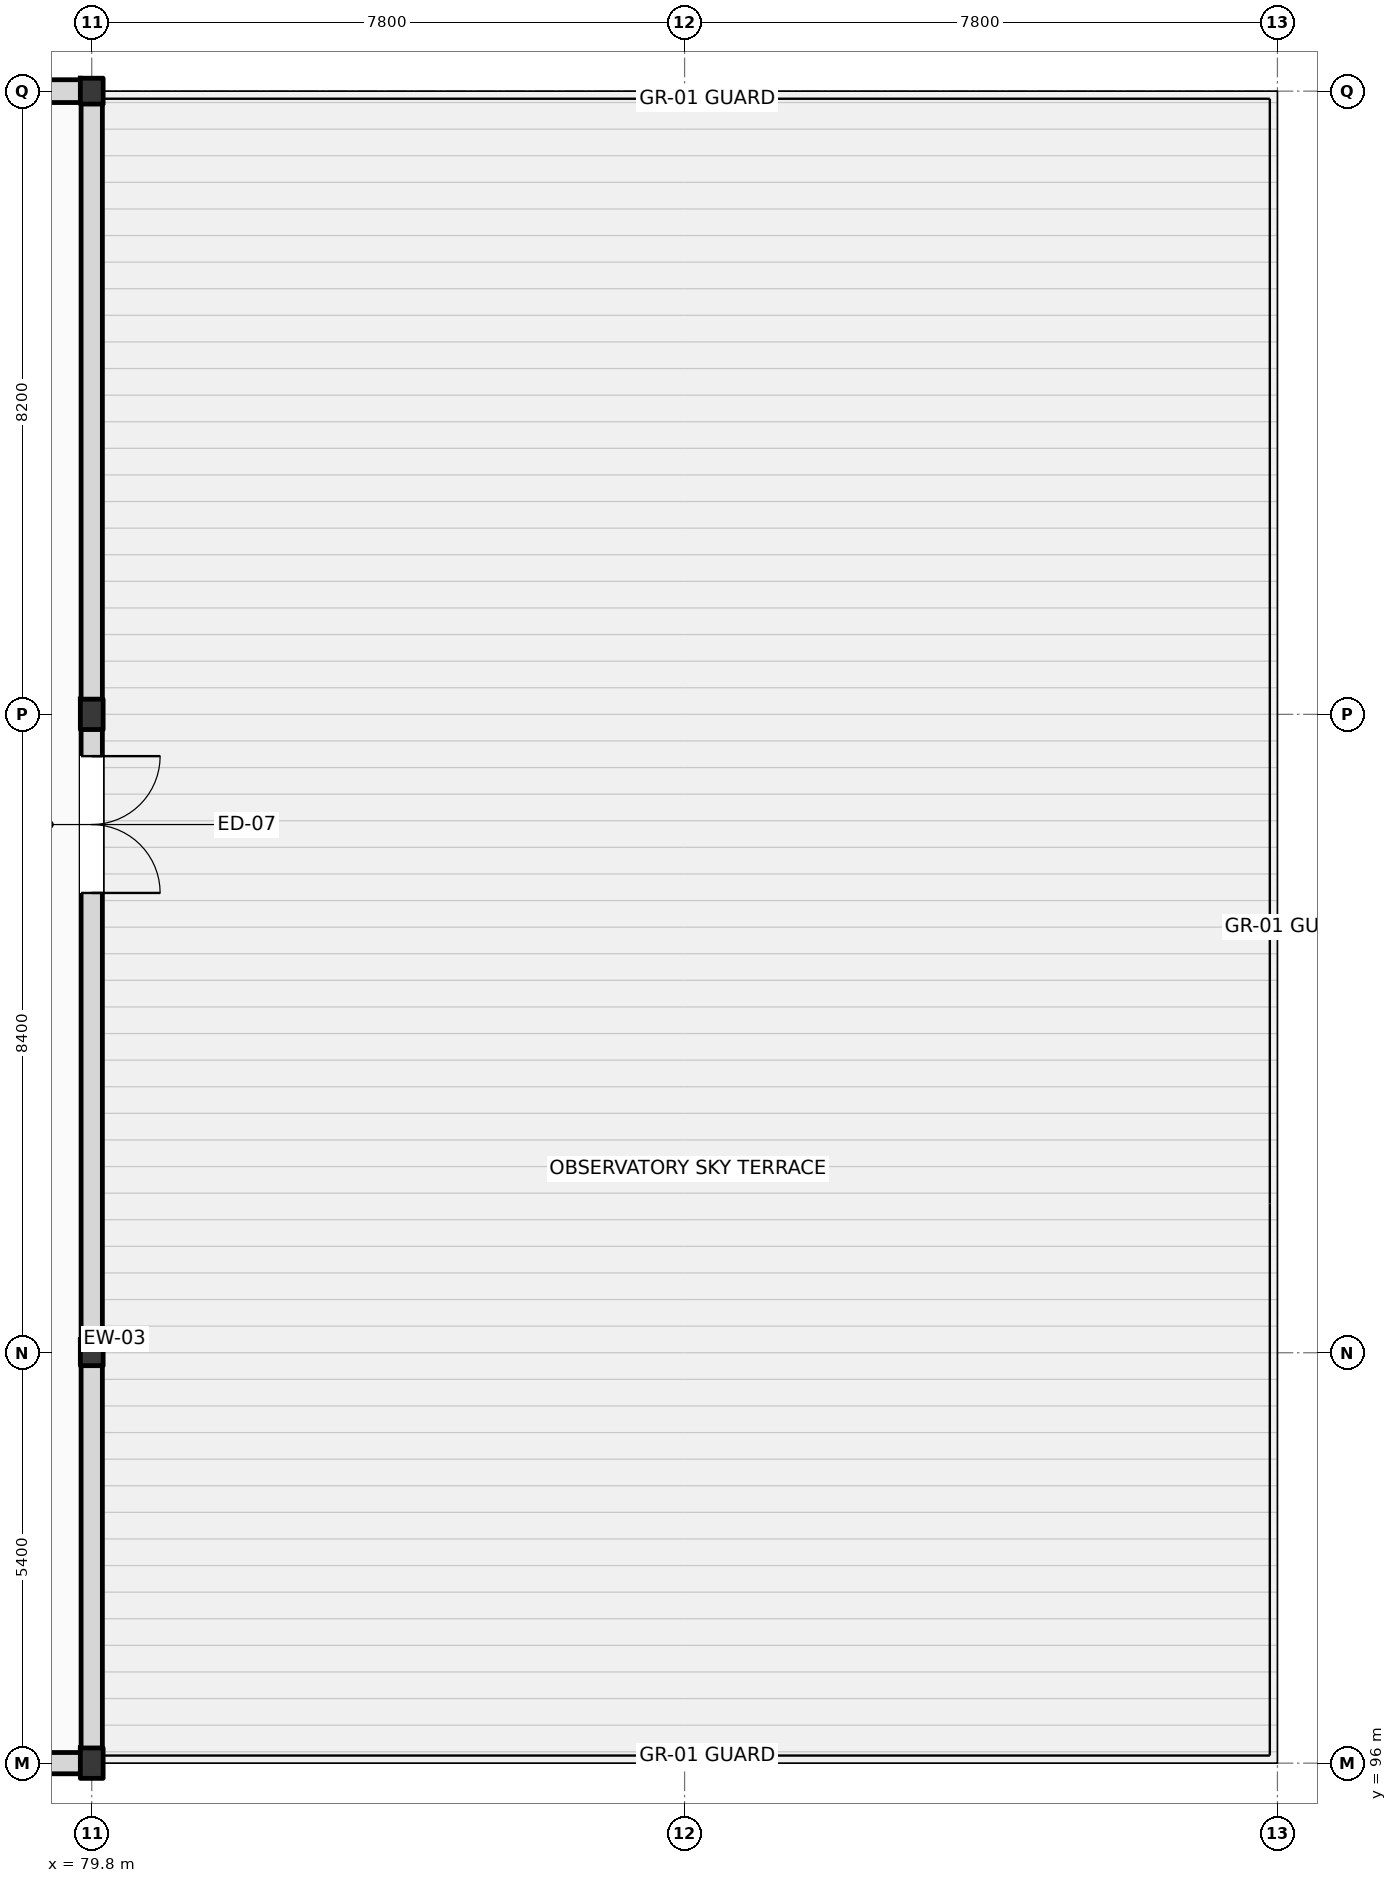
"""IFC4 building model, lengths in metres.
Left out: names, types, materials, properties, quantities, classifications, styles, units other than length and angle.
Written with IfcOpenShell. Run it as: python <this file> out.ifc"""

import sys

from ifc_helpers import new_model, si_unit, direction, frame, frame_2d, origin, origin_2d, place, context, subcontext, project, spatial, rectangle, i_section, extrude, element, fill, save


model = new_model("IFC4")
c1 = context("Model", 3, precision=1e-05, world=origin(), true_north=direction((0.0, 1.0)))
c2 = subcontext(c1, "Body", "Model", "MODEL_VIEW")
j1 = project(units=[si_unit("LENGTHUNIT", "METRE"), si_unit("PLANEANGLEUNIT", "RADIAN")], contexts=[c1])
p1 = place(None, origin())
s1 = spatial("IfcSite", under=j1, at=p1, CompositionType="ELEMENT")
p2 = place(p1, origin())
s2 = spatial("IfcBuilding", under=s1, at=p2, CompositionType="ELEMENT")
p3 = place(p2, frame((0.0, 0.0, 46.8)))
s3 = spatial("IfcBuildingStorey", under=s2, at=p3, CompositionType="ELEMENT", Elevation=46.8)
p4 = place(p3, frame((79.8, 96.0, 0.0), z_axis=(0.0, 0.0, 1.0), x_axis=(1.0, 0.0, 0.0)))
e1 = element("IfcColumn", 1, at=p4, inside=s3, PredefinedType="COLUMN", context=c2, shape_type="SweptSolid", body=[
    extrude(i_section(OverallWidth=0.3, OverallDepth=0.4, WebThickness=0.013, FlangeThickness=0.024, FilletRadius=0.027, at=origin_2d()), origin(), (0.0, 0.0, 1.0), 4.8),
])
p5 = place(p3, frame((79.8, 101.4, 0.0), z_axis=(0.0, 0.0, 1.0), x_axis=(1.0, 0.0, 0.0)))
e2 = element("IfcColumn", 2, at=p5, inside=s3, PredefinedType="COLUMN", context=c2, shape_type="SweptSolid", body=[
    extrude(i_section(OverallWidth=0.3, OverallDepth=0.34, WebThickness=0.012, FlangeThickness=0.021, FilletRadius=0.027, at=origin_2d()), origin(), (0.0, 0.0, 1.0), 4.8),
])
p6 = place(p3, frame((79.8, 109.8, 0.0), z_axis=(0.0, 0.0, 1.0), x_axis=(1.0, 0.0, 0.0)))
e3 = element("IfcColumn", 3, at=p6, inside=s3, PredefinedType="COLUMN", context=c2, shape_type="SweptSolid", body=[
    extrude(i_section(OverallWidth=0.3, OverallDepth=0.4, WebThickness=0.013, FlangeThickness=0.024, FilletRadius=0.027, at=origin_2d()), origin(), (0.0, 0.0, 1.0), 4.8),
])
p7 = place(p3, frame((79.8, 118.0, 0.0), z_axis=(0.0, 0.0, 1.0), x_axis=(1.0, 0.0, 0.0)))
e4 = element("IfcColumn", 4, at=p7, inside=s3, PredefinedType="COLUMN", context=c2, shape_type="SweptSolid", body=[
    extrude(i_section(OverallWidth=0.3, OverallDepth=0.34, WebThickness=0.012, FlangeThickness=0.021, FilletRadius=0.027, at=origin_2d()), origin(), (0.0, 0.0, 1.0), 4.8),
])
p8 = place(p3, frame((22.5, 118.0, 0.0), z_axis=(0.0, 0.0, 1.0), x_axis=(1.0, 0.0, 0.0)))
e5 = element("IfcWall", 5, at=p8, inside=s3, PredefinedType="STANDARD", context=c2, shape_type="SweptSolid", body=[
    extrude(rectangle(XDim=57.3, YDim=0.3, at=frame_2d((28.65, 0.0))), origin(), (0.0, 0.0, 1.0), 4.08),
])
p9 = place(p8, frame((3.5, 0.0, 0.85)))
e6 = element("IfcOpeningElement", 6, at=p9, cuts=e5, PredefinedType="OPENING", context=c2, shape_type="SweptSolid", body=[
    extrude(rectangle(XDim=2.7, YDim=2.4, at=frame_2d((1.35, 1.2))), frame((0.0, 0.16, 0.0), z_axis=(0.0, -1.0, 0.0), x_axis=(1.0, 0.0, 0.0)), (0.0, 0.0, 1.0), 0.32),
])
p10 = place(p8, frame((19.1, 0.0, 0.85)))
e7 = element("IfcOpeningElement", 7, at=p10, cuts=e5, PredefinedType="OPENING", context=c2, shape_type="SweptSolid", body=[
    extrude(rectangle(XDim=2.7, YDim=2.4, at=frame_2d((1.35, 1.2))), frame((0.0, 0.16, 0.0), z_axis=(0.0, -1.0, 0.0), x_axis=(1.0, 0.0, 0.0)), (0.0, 0.0, 1.0), 0.32),
])
p11 = place(p8, frame((34.7, 0.0, 0.85)))
e8 = element("IfcOpeningElement", 8, at=p11, cuts=e5, PredefinedType="OPENING", context=c2, shape_type="SweptSolid", body=[
    extrude(rectangle(XDim=2.7, YDim=2.4, at=frame_2d((1.35, 1.2))), frame((0.0, 0.16, 0.0), z_axis=(0.0, -1.0, 0.0), x_axis=(1.0, 0.0, 0.0)), (0.0, 0.0, 1.0), 0.32),
])
p12 = place(p8, frame((45.5, 0.0, 0.85)))
e9 = element("IfcOpeningElement", 9, at=p12, cuts=e5, PredefinedType="OPENING", context=c2, shape_type="SweptSolid", body=[
    extrude(rectangle(XDim=2.7, YDim=2.4, at=frame_2d((1.35, 1.2))), frame((0.0, 0.16, 0.0), z_axis=(0.0, -1.0, 0.0), x_axis=(1.0, 0.0, 0.0)), (0.0, 0.0, 1.0), 0.32),
])
p13 = place(p3, frame((79.8, 96.0, 0.0), z_axis=(0.0, 0.0, 1.0), x_axis=(0.0, 1.0, 0.0)))
e10 = element("IfcWall", 10, at=p13, inside=s3, PredefinedType="STANDARD", context=c2, shape_type="SweptSolid", body=[
    extrude(rectangle(XDim=22.0, YDim=0.28, at=frame_2d((11.0, 0.0))), origin(), (0.0, 0.0, 1.0), 4.17),
])
p14 = place(p13, frame((11.45, 0.0, 0.0)))
e11 = element("IfcOpeningElement", 11, at=p14, cuts=e10, PredefinedType="OPENING", context=c2, shape_type="SweptSolid", body=[
    extrude(rectangle(XDim=1.8, YDim=2.4, at=frame_2d((0.9, 1.2))), frame((0.0, 0.15, 0.0), z_axis=(0.0, -1.0, 0.0), x_axis=(1.0, 0.0, 0.0)), (0.0, 0.0, 1.0), 0.3),
])
p15 = place(p3, frame((25.2, 96.0, 0.0), z_axis=(0.0, 0.0, 1.0), x_axis=(1.0, 0.0, 0.0)))
e12 = element("IfcWall", 12, at=p15, inside=s3, PredefinedType="STANDARD", context=c2, shape_type="SweptSolid", body=[
    extrude(rectangle(XDim=54.6, YDim=0.28, at=frame_2d((27.3, 0.0))), origin(), (0.0, 0.0, 1.0), 4.08),
])
p16 = place(p14, frame((1.8, 0.0, 0.0), z_axis=(0.0, 0.0, 1.0), x_axis=(-1.0, 0.0, 0.0)))
e13 = element("IfcDoor", 13, at=p16, inside=s3, OperationType="DOUBLE_SWING_LEFT", PredefinedType="DOOR", context=c2, shape_type="SweptSolid", body=[
    extrude(rectangle(XDim=1.8, YDim=2.4, at=frame_2d((0.9, 1.2))), frame((0.0, 0.025, 0.0), z_axis=(0.0, -1.0, 0.0), x_axis=(1.0, 0.0, 0.0)), (0.0, 0.0, 1.0), 0.05),
])
fill(e11, e13)
save(model, sys.argv[1])
